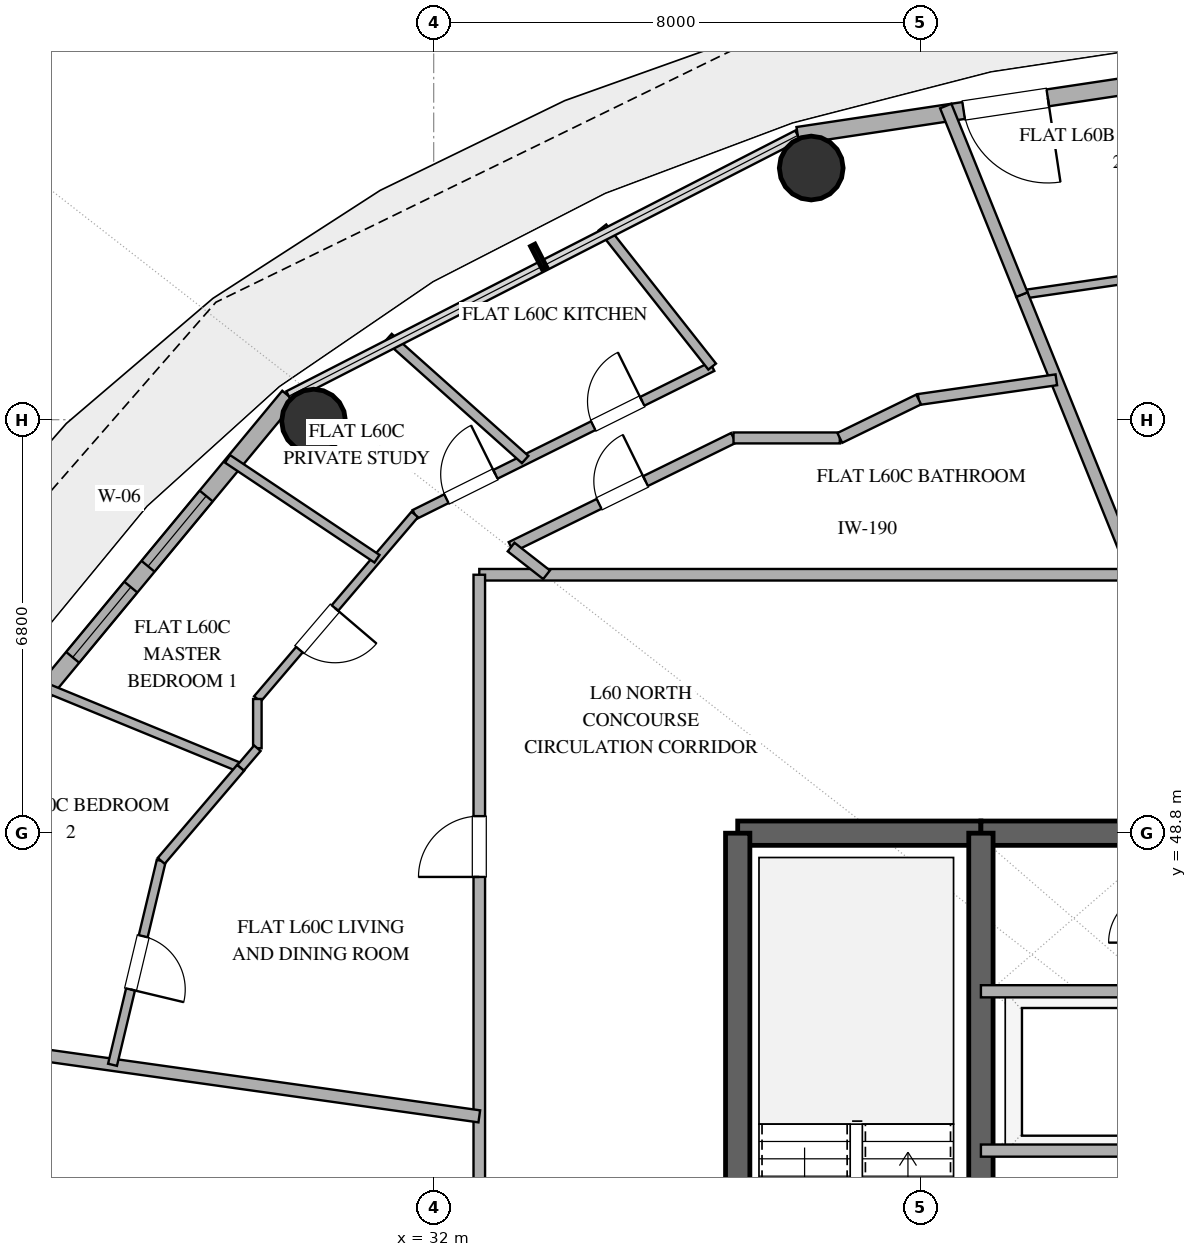
"""IFC4 building model, lengths in metres.
Left out: names, types, materials, properties, quantities, classifications, styles, units other than length and angle.
Written with IfcOpenShell. Run it as: python <this file> out.ifc"""

import sys

from ifc_helpers import new_model, si_unit, direction, frame, frame_2d, origin, origin_2d, place, context, subcontext, project, spatial, rectangle, hollow_circle, extrude, element, fill, save


model = new_model("IFC4")
c1 = context("Model", 3, precision=1e-05, world=origin(), true_north=direction((0.0, 1.0)))
c2 = subcontext(c1, "Body", "Model", "MODEL_VIEW")
j1 = project(units=[si_unit("LENGTHUNIT", "METRE"), si_unit("PLANEANGLEUNIT", "RADIAN")], contexts=[c1])
p1 = place(None, origin())
s1 = spatial("IfcSite", under=j1, at=p1, CompositionType="ELEMENT")
p2 = place(p1, origin())
s2 = spatial("IfcBuilding", under=s1, at=p2, CompositionType="ELEMENT")
p3 = place(p2, frame((0.0, 0.0, 235.2)))
s3 = spatial("IfcBuildingStorey", under=s2, at=p3, CompositionType="ELEMENT", Elevation=235.2)
p4 = place(p3, frame((37.0, 48.8, 0.0), z_axis=(0.0, 0.0, 1.0), x_axis=(1.0, 0.0, 0.0)))
e1 = element("IfcWall", 1, at=p4, inside=s3, PredefinedType="SHEAR", context=c2, shape_type="SweptSolid", body=[
    extrude(rectangle(XDim=4.0, YDim=0.4, at=frame_2d((2.0, 0.0))), origin(), (0.0, 0.0, 1.0), 3.36),
])
p5 = place(p3, frame((41.0, 48.8, 0.0), z_axis=(0.0, 0.0, 1.0), x_axis=(1.0, 0.0, 0.0)))
e2 = element("IfcWall", 2, at=p5, inside=s3, PredefinedType="SHEAR", context=c2, shape_type="SweptSolid", body=[
    extrude(rectangle(XDim=14.0, YDim=0.4, at=frame_2d((7.0, 0.0))), origin(), (0.0, 0.0, 1.0), 3.36),
])
p6 = place(p5, frame((6.1, 0.0, 0.0)))
e3 = element("IfcOpeningElement", 3, at=p6, cuts=e2, PredefinedType="OPENING", context=c2, shape_type="SweptSolid", body=[
    extrude(rectangle(XDim=1.8, YDim=2.25, at=frame_2d((0.9, 1.125))), frame((0.0, 0.21, 0.0), z_axis=(0.0, -1.0, 0.0), x_axis=(1.0, 0.0, 0.0)), (0.0, 0.0, 1.0), 0.42),
])
p7 = place(p3, frame((37.0, 35.2, 0.0), z_axis=(0.0, 0.0, 1.0), x_axis=(0.0, 1.0, 0.0)))
e4 = element("IfcWall", 4, at=p7, inside=s3, PredefinedType="SHEAR", context=c2, shape_type="SweptSolid", body=[
    extrude(rectangle(XDim=13.6, YDim=0.4, at=frame_2d((6.8, 0.0))), origin(), (0.0, 0.0, 1.0), 3.36),
])
p8 = place(p3, frame((41.0, 35.2, 0.0), z_axis=(0.0, 0.0, 1.0), x_axis=(0.0, 1.0, 0.0)))
e5 = element("IfcWall", 5, at=p8, inside=s3, PredefinedType="SHEAR", context=c2, shape_type="SweptSolid", body=[
    extrude(rectangle(XDim=13.6, YDim=0.4, at=frame_2d((6.8, 0.0))), origin(), (0.0, 0.0, 1.0), 3.36),
])
p9 = place(p8, frame((1.15, 0.0, 0.0)))
e6 = element("IfcOpeningElement", 6, at=p9, cuts=e5, PredefinedType="OPENING", context=c2, shape_type="SweptSolid", body=[
    extrude(rectangle(XDim=1.1, YDim=2.2, at=frame_2d((0.55, 1.1))), frame((0.0, 0.21, 0.0), z_axis=(0.0, -1.0, 0.0), x_axis=(1.0, 0.0, 0.0)), (0.0, 0.0, 1.0), 0.42),
])
for number, where, z_axis, x_axis in (
    (7, (38.209, 59.739, 0.0), (0.0, 0.0, 1.0), (1.0, 0.0, 0.0)),
    (8, (30.025, 55.576, 0.0), (0.0, 0.0, 1.0), (1.0, 0.0, 0.0)),
):
    element("IfcColumn", number, at=place(p3, frame(where, z_axis=z_axis, x_axis=x_axis)), inside=s3, PredefinedType="COLUMN", context=c2, shape_type="SweptSolid", body=[
        extrude(hollow_circle(Radius=0.525, WallThickness=0.028, at=origin_2d()), origin(), (0.0, 0.0, 1.0), 3.36),
    ])
p10 = place(p3, frame((48.0, 61.78, 0.0), z_axis=(0.0, 0.0, 1.0), x_axis=(-0.988882522213, -0.148698881169, 0.0)))
e9 = element("IfcWall", 9, at=p10, inside=s3, PredefinedType="SOLIDWALL", context=c2, shape_type="SweptSolid", body=[
    extrude(rectangle(XDim=10.125, YDim=0.28, at=frame_2d((5.062, 0.0))), origin(), (0.0, 0.0, 1.0), 3.36),
])
p11 = place(p10, frame((5.967, 0.0, 0.0)))
e10 = element("IfcOpeningElement", 10, at=p11, cuts=e9, PredefinedType="OPENING", context=c2, shape_type="SweptSolid", body=[
    extrude(rectangle(XDim=1.4, YDim=2.2, at=frame_2d((0.7, 1.1))), frame((0.0, 0.15, 0.0), z_axis=(0.0, -1.0, 0.0), x_axis=(1.0, 0.0, 0.0)), (0.0, 0.0, 1.0), 0.3),
])
p12 = place(p10, frame((0.866, 0.0, 0.85)))
e11 = element("IfcOpeningElement", 11, at=p12, cuts=e9, PredefinedType="OPENING", context=c2, shape_type="SweptSolid", body=[
    extrude(rectangle(XDim=1.0, YDim=1.8, at=frame_2d((0.5, 0.9))), frame((0.0, 0.15, 0.0), z_axis=(0.0, -1.0, 0.0), x_axis=(1.0, 0.0, 0.0)), (0.0, 0.0, 1.0), 0.3),
])
p13 = place(p3, frame((29.617, 55.987, 0.0), z_axis=(0.0, 0.0, 1.0), x_axis=(-0.63761509934, -0.770355103243, 0.0)))
e12 = element("IfcWall", 12, at=p13, inside=s3, PredefinedType="SOLIDWALL", context=c2, shape_type="SweptSolid", body=[
    extrude(rectangle(XDim=8.33, YDim=0.28, at=frame_2d((4.165, 0.0))), origin(), (0.0, 0.0, 1.0), 3.36),
])
p14 = place(p13, frame((2.131, 0.0, 0.85)))
e13 = element("IfcOpeningElement", 13, at=p14, cuts=e12, PredefinedType="OPENING", context=c2, shape_type="SweptSolid", body=[
    extrude(rectangle(XDim=1.5, YDim=2.0, at=frame_2d((0.75, 1.0))), frame((0.0, 0.15, 0.0), z_axis=(0.0, -1.0, 0.0), x_axis=(1.0, 0.0, 0.0)), (0.0, 0.0, 1.0), 0.3),
])
p15 = place(p13, frame((4.075, 0.0, 0.85)))
e14 = element("IfcOpeningElement", 14, at=p15, cuts=e12, PredefinedType="OPENING", context=c2, shape_type="SweptSolid", body=[
    extrude(rectangle(XDim=1.5, YDim=2.0, at=frame_2d((0.75, 1.0))), frame((0.0, 0.15, 0.0), z_axis=(0.0, -1.0, 0.0), x_axis=(1.0, 0.0, 0.0)), (0.0, 0.0, 1.0), 0.3),
])
p16 = place(p13, frame((6.536, 0.0, 0.85)))
e15 = element("IfcOpeningElement", 15, at=p16, cuts=e12, PredefinedType="OPENING", context=c2, shape_type="SweptSolid", body=[
    extrude(rectangle(XDim=0.85, YDim=1.8, at=frame_2d((0.425, 0.9))), frame((0.0, 0.15, 0.0), z_axis=(0.0, -1.0, 0.0), x_axis=(1.0, 0.0, 0.0)), (0.0, 0.0, 1.0), 0.3),
])
for number, where, z_axis, x_axis in (
    (16, (41.0, 46.2, 0.0), (0.0, 0.0, 1.0), (1.0, 0.0, 0.0)),
    (17, (41.0, 43.58, 0.0), (0.0, 0.0, 1.0), (1.0, 0.0, 0.0)),
):
    element("IfcWall", number, at=place(p3, frame(where, z_axis=z_axis, x_axis=x_axis)), inside=s3, PredefinedType="SOLIDWALL", context=c2, shape_type="SweptSolid", body=[
        extrude(rectangle(XDim=2.95, YDim=0.2, at=frame_2d((1.475, 0.0))), origin(), (0.0, 0.0, 1.0), 2.72),
    ])
p17 = place(p3, frame((23.868, 45.392, 0.0), z_axis=(0.0, 0.0, 1.0), x_axis=(0.281018983641, -0.959702209455, 0.0)))
e18 = element("IfcWall", 18, at=p17, inside=s3, PredefinedType="PLUMBINGWALL", context=c2, shape_type="SweptSolid", body=[
    extrude(rectangle(XDim=10.036, YDim=0.16, at=frame_2d((5.018, 0.0))), origin(), (0.0, 0.0, 1.0), 2.72),
])
p18 = place(p17, frame((4.568, 0.0, 0.0)))
e19 = element("IfcOpeningElement", 19, at=p18, cuts=e18, PredefinedType="OPENING", context=c2, shape_type="SweptSolid", body=[
    extrude(rectangle(XDim=0.9, YDim=2.1, at=frame_2d((0.45, 1.05))), frame((0.0, 0.09, 0.0), z_axis=(0.0, -1.0, 0.0), x_axis=(1.0, 0.0, 0.0)), (0.0, 0.0, 1.0), 0.18),
])
p19 = place(p3, frame((32.75, 53.05, 0.0), z_axis=(0.0, 0.0, 1.0), x_axis=(1.0, 0.0, 0.0)))
e20 = element("IfcWall", 20, at=p19, inside=s3, PredefinedType="PARTITIONING", context=c2, shape_type="SweptSolid", body=[
    extrude(rectangle(XDim=12.766, YDim=0.19, at=frame_2d((6.383, 0.0))), origin(), (0.0, 0.0, 1.0), 2.72),
])
p20 = place(p3, frame((32.75, 42.243, 0.0), z_axis=(0.0, 0.0, 1.0), x_axis=(0.0, 1.0, 0.0)))
e21 = element("IfcWall", 21, at=p20, inside=s3, PredefinedType="PARTITIONING", context=c2, shape_type="SweptSolid", body=[
    extrude(rectangle(XDim=10.807, YDim=0.19, at=frame_2d((5.404, 0.0))), origin(), (0.0, 0.0, 1.0), 2.72),
])
p21 = place(p20, frame((5.837, 0.0, 0.0)))
e22 = element("IfcOpeningElement", 22, at=p21, cuts=e21, PredefinedType="OPENING", context=c2, shape_type="SweptSolid", body=[
    extrude(rectangle(XDim=1.0, YDim=2.2, at=frame_2d((0.5, 1.1))), frame((0.0, 0.105, 0.0), z_axis=(0.0, -1.0, 0.0), x_axis=(1.0, 0.0, 0.0)), (0.0, 0.0, 1.0), 0.21),
])
p22 = place(p3, frame((23.237, 45.48, 0.0), z_axis=(0.0, 0.0, 1.0), x_axis=(0.990269661234, -0.139161769316, 0.0)))
e23 = element("IfcWall", 23, at=p22, inside=s3, PredefinedType="PARTITIONING", context=c2, shape_type="SweptSolid", body=[
    extrude(rectangle(XDim=9.607, YDim=0.2, at=frame_2d((4.803, 0.0))), origin(), (0.0, 0.0, 1.0), 2.72),
])
p23 = place(p3, frame((41.674, 57.657, 0.0), z_axis=(0.0, 0.0, 1.0), x_axis=(0.989537524877, 0.144275732054, 0.0)))
e24 = element("IfcWall", 24, at=p23, inside=s3, PredefinedType="PARTITIONING", context=c2, shape_type="SweptSolid", body=[
    extrude(rectangle(XDim=6.393, YDim=0.14, at=frame_2d((3.197, 0.0))), origin(), (0.0, 0.0, 1.0), 2.72),
])
p24 = place(p23, frame((1.609, 0.0, 0.0)))
e25 = element("IfcOpeningElement", 25, at=p24, cuts=e24, PredefinedType="OPENING", context=c2, shape_type="SweptSolid", body=[
    extrude(rectangle(XDim=0.9, YDim=2.1, at=frame_2d((0.45, 1.05))), frame((0.0, 0.08, 0.0), z_axis=(0.0, -1.0, 0.0), x_axis=(1.0, 0.0, 0.0)), (0.0, 0.0, 1.0), 0.16),
])
p25 = place(p23, frame((4.789, 0.0, 0.0)))
e26 = element("IfcOpeningElement", 26, at=p25, cuts=e24, PredefinedType="OPENING", context=c2, shape_type="SweptSolid", body=[
    extrude(rectangle(XDim=0.9, YDim=2.1, at=frame_2d((0.45, 1.05))), frame((0.0, 0.08, 0.0), z_axis=(0.0, -1.0, 0.0), x_axis=(1.0, 0.0, 0.0)), (0.0, 0.0, 1.0), 0.16),
])
p26 = place(p3, frame((33.273, 53.506, 0.0), z_axis=(0.0, 0.0, 1.0), x_axis=(0.89778136281, 0.440441397454, 0.0)))
e27 = element("IfcWall", 27, at=p26, inside=s3, PredefinedType="PLUMBINGWALL", context=c2, shape_type="SweptSolid", body=[
    extrude(rectangle(XDim=4.074, YDim=0.18, at=frame_2d((2.037, 0.0))), origin(), (0.0, 0.0, 1.0), 2.72),
])
p27 = place(p26, frame((1.612, 0.0, 0.0)))
e28 = element("IfcOpeningElement", 28, at=p27, cuts=e27, PredefinedType="OPENING", context=c2, shape_type="SweptSolid", body=[
    extrude(rectangle(XDim=0.85, YDim=2.1, at=frame_2d((0.425, 1.05))), frame((0.0, 0.1, 0.0), z_axis=(0.0, -1.0, 0.0), x_axis=(1.0, 0.0, 0.0)), (0.0, 0.0, 1.0), 0.2),
])
p28 = place(p3, frame((25.531, 51.229, 0.0), z_axis=(0.0, 0.0, 1.0), x_axis=(0.925009924445, -0.37994294266, 0.0)))
e29 = element("IfcWall", 29, at=p28, inside=s3, PredefinedType="PARTITIONING", context=c2, shape_type="SweptSolid", body=[
    extrude(rectangle(XDim=3.562, YDim=0.15, at=frame_2d((1.781, 0.0))), origin(), (0.0, 0.0, 1.0), 2.72),
])
p29 = place(p3, frame((31.689, 54.042, 0.0), z_axis=(0.0, 0.0, 1.0), x_axis=(0.895479575413, 0.445102606168, 0.0)))
e30 = element("IfcWall", 30, at=p29, inside=s3, PredefinedType="PLUMBINGWALL", context=c2, shape_type="SweptSolid", body=[
    extrude(rectangle(XDim=5.462, YDim=0.16, at=frame_2d((2.731, 0.0))), origin(), (0.0, 0.0, 1.0), 2.72),
])
p30 = place(p29, frame((3.278, 0.0, 0.0)))
e31 = element("IfcOpeningElement", 31, at=p30, cuts=e30, PredefinedType="OPENING", context=c2, shape_type="SweptSolid", body=[
    extrude(rectangle(XDim=0.9, YDim=2.1, at=frame_2d((0.45, 1.05))), frame((0.0, 0.09, 0.0), z_axis=(0.0, -1.0, 0.0), x_axis=(1.0, 0.0, 0.0)), (0.0, 0.0, 1.0), 0.18),
])
p31 = place(p29, frame((0.581, 0.0, 0.0)))
e32 = element("IfcOpeningElement", 32, at=p31, cuts=e30, PredefinedType="OPENING", context=c2, shape_type="SweptSolid", body=[
    extrude(rectangle(XDim=0.9, YDim=2.1, at=frame_2d((0.45, 1.05))), frame((0.0, 0.09, 0.0), z_axis=(0.0, -1.0, 0.0), x_axis=(1.0, 0.0, 0.0)), (0.0, 0.0, 1.0), 0.18),
])
p32 = place(p3, frame((41.674, 57.657, 0.0), z_axis=(0.0, 0.0, 1.0), x_axis=(0.374573524941, -0.927197214412, 0.0)))
e33 = element("IfcWall", 33, at=p32, inside=s3, PredefinedType="PARTITIONING", context=c2, shape_type="SweptSolid", body=[
    extrude(rectangle(XDim=4.969, YDim=0.2, at=frame_2d((2.485, 0.0))), origin(), (0.0, 0.0, 1.0), 2.72),
])
p33 = place(p3, frame((27.519, 48.345, 0.0), z_axis=(0.0, 0.0, 1.0), x_axis=(-0.232293676314, -0.97264569497, 0.0)))
e34 = element("IfcWall", 34, at=p33, inside=s3, PredefinedType="PARTITIONING", context=c2, shape_type="SweptSolid", body=[
    extrude(rectangle(XDim=3.448, YDim=0.15, at=frame_2d((1.724, 0.0))), origin(), (0.0, 0.0, 1.0), 2.72),
])
p34 = place(p33, frame((1.274, 0.0, 0.0)))
e35 = element("IfcOpeningElement", 35, at=p34, cuts=e34, PredefinedType="OPENING", context=c2, shape_type="SweptSolid", body=[
    extrude(rectangle(XDim=0.9, YDim=2.1, at=frame_2d((0.45, 1.05))), frame((0.0, 0.085, 0.0), z_axis=(0.0, -1.0, 0.0), x_axis=(1.0, 0.0, 0.0)), (0.0, 0.0, 1.0), 0.17),
])
p35 = place(p3, frame((41.674, 57.657, 0.0), z_axis=(0.0, 0.0, 1.0), x_axis=(-0.374572886439, 0.927197472357, 0.0)))
e36 = element("IfcWall", 36, at=p35, inside=s3, PredefinedType="PARTITIONING", context=c2, shape_type="SweptSolid", body=[
    extrude(rectangle(XDim=3.344, YDim=0.2, at=frame_2d((1.672, 0.0))), origin(), (0.0, 0.0, 1.0), 2.72),
])
p36 = place(p3, frame((31.689, 54.042, 0.0), z_axis=(0.0, 0.0, 1.0), x_axis=(-0.648985159088, -0.760801066826, 0.0)))
e37 = element("IfcWall", 37, at=p36, inside=s3, PredefinedType="PARTITIONING", context=c2, shape_type="SweptSolid", body=[
    extrude(rectangle(XDim=3.989, YDim=0.14, at=frame_2d((1.995, 0.0))), origin(), (0.0, 0.0, 1.0), 2.72),
])
p37 = place(p36, frame((2.023, 0.0, 0.0)))
e38 = element("IfcOpeningElement", 38, at=p37, cuts=e37, PredefinedType="OPENING", context=c2, shape_type="SweptSolid", body=[
    extrude(rectangle(XDim=0.9, YDim=2.1, at=frame_2d((0.45, 1.05))), frame((0.0, 0.08, 0.0), z_axis=(0.0, -1.0, 0.0), x_axis=(1.0, 0.0, 0.0)), (0.0, 0.0, 1.0), 0.16),
])
p38 = place(p3, frame((33.505, 54.945, 0.0), z_axis=(0.0, 0.0, 1.0), x_axis=(-0.745914664094, 0.66604152565, 0.0)))
e39 = element("IfcWall", 39, at=p38, inside=s3, PredefinedType="PLUMBINGWALL", context=c2, shape_type="SweptSolid", body=[
    extrude(rectangle(XDim=3.014, YDim=0.16, at=frame_2d((1.507, 0.0))), origin(), (0.0, 0.0, 1.0), 2.72),
])
p39 = place(p3, frame((28.609, 54.956, 0.0), z_axis=(0.0, 0.0, 1.0), x_axis=(0.831478101563, -0.555557527733, 0.0)))
e40 = element("IfcWall", 40, at=p39, inside=s3, PredefinedType="PARTITIONING", context=c2, shape_type="SweptSolid", body=[
    extrude(rectangle(XDim=2.956, YDim=0.15, at=frame_2d((1.478, 0.0))), origin(), (0.0, 0.0, 1.0), 2.72),
])
p40 = place(p3, frame((36.58, 56.473, 0.0), z_axis=(0.0, 0.0, 1.0), x_axis=(-0.619378047354, 0.785092882694, 0.0)))
e41 = element("IfcWall", 41, at=p40, inside=s3, PredefinedType="PLUMBINGWALL", context=c2, shape_type="SweptSolid", body=[
    extrude(rectangle(XDim=2.914, YDim=0.16, at=frame_2d((1.457, 0.0))), origin(), (0.0, 0.0, 1.0), 2.72),
])
p41 = place(p3, frame((39.976, 55.932, 0.0), z_axis=(0.0, 0.0, 1.0), x_axis=(0.989917445937, 0.141645509032, 0.0)))
e42 = element("IfcWall", 42, at=p41, inside=s3, PredefinedType="PLUMBINGWALL", context=c2, shape_type="SweptSolid", body=[
    extrude(rectangle(XDim=2.287, YDim=0.18, at=frame_2d((1.144, 0.0))), origin(), (0.0, 0.0, 1.0), 2.72),
])
p42 = place(p3, frame((28.826, 49.876, 0.0), z_axis=(0.0, 0.0, 1.0), x_axis=(-0.649252114502, -0.760573265251, 0.0)))
e43 = element("IfcWall", 43, at=p42, inside=s3, PredefinedType="PARTITIONING", context=c2, shape_type="SweptSolid", body=[
    extrude(rectangle(XDim=2.013, YDim=0.15, at=frame_2d((1.007, 0.0))), origin(), (0.0, 0.0, 1.0), 2.72),
])
p43 = place(p3, frame((36.931, 55.3, 0.0), z_axis=(0.0, 0.0, 1.0), x_axis=(1.0, 0.0, 0.0)))
e44 = element("IfcWall", 44, at=p43, inside=s3, PredefinedType="PLUMBINGWALL", context=c2, shape_type="SweptSolid", body=[
    extrude(rectangle(XDim=1.748, YDim=0.18, at=frame_2d((0.874, 0.0))), origin(), (0.0, 0.0, 1.0), 2.72),
])
p44 = place(p3, frame((38.679, 55.3, 0.0), z_axis=(0.0, 0.0, 1.0), x_axis=(0.898916394035, 0.438120207861, 0.0)))
e45 = element("IfcWall", 45, at=p44, inside=s3, PredefinedType="PLUMBINGWALL", context=c2, shape_type="SweptSolid", body=[
    extrude(rectangle(XDim=1.443, YDim=0.18, at=frame_2d((0.721, 0.0))), origin(), (0.0, 0.0, 1.0), 2.72),
])
p45 = place(p3, frame((29.1, 51.007, 0.0), z_axis=(0.0, 0.0, 1.0), x_axis=(0.0, -1.0, 0.0)))
e46 = element("IfcWall", 46, at=p45, inside=s3, PredefinedType="PARTITIONING", context=c2, shape_type="SweptSolid", body=[
    extrude(rectangle(XDim=0.81, YDim=0.14, at=frame_2d((0.405, 0.0))), origin(), (0.0, 0.0, 1.0), 2.72),
])
p46 = place(p3, frame((33.857, 53.05, 0.0), z_axis=(0.0, 0.0, 1.0), x_axis=(-0.788214334349, 0.615400815019, 0.0)))
e47 = element("IfcWall", 47, at=p46, inside=s3, PredefinedType="PLUMBINGWALL", context=c2, shape_type="SweptSolid", body=[
    extrude(rectangle(XDim=0.74, YDim=0.18, at=frame_2d((0.37, 0.0))), origin(), (0.0, 0.0, 1.0), 2.72),
])
p47 = place(p3, frame((29.1, 50.197, 0.0), z_axis=(0.0, 0.0, 1.0), x_axis=(-0.649360360175, -0.760480849617, 0.0)))
e48 = element("IfcWall", 48, at=p47, inside=s3, PredefinedType="PARTITIONING", context=c2, shape_type="SweptSolid", body=[
    extrude(rectangle(XDim=0.422, YDim=0.14, at=frame_2d((0.211, 0.0))), origin(), (0.0, 0.0, 1.0), 2.72),
])
p48 = place(p11, origin())
e49 = element("IfcDoor", 49, at=p48, inside=s3, OperationType="SINGLE_SWING_LEFT", PredefinedType="DOOR", context=c2, shape_type="SweptSolid", body=[
    extrude(rectangle(XDim=1.4, YDim=2.2, at=frame_2d((0.7, 1.1))), frame((0.0, 0.025, 0.0), z_axis=(0.0, -1.0, 0.0), x_axis=(1.0, 0.0, 0.0)), (0.0, 0.0, 1.0), 0.05),
])
fill(e10, e49)
p49 = place(p14, origin())
e50 = element("IfcWindow", 50, at=p49, inside=s3, PartitioningType="SINGLE_PANEL", PredefinedType="WINDOW", context=c2, shape_type="SweptSolid", body=[
    extrude(rectangle(XDim=1.5, YDim=2.0, at=frame_2d((0.75, 1.0))), frame((0.0, 0.03, 0.0), z_axis=(0.0, -1.0, 0.0), x_axis=(1.0, 0.0, 0.0)), (0.0, 0.0, 1.0), 0.06),
])
fill(e13, e50)
p50 = place(p15, origin())
e51 = element("IfcWindow", 51, at=p50, inside=s3, PartitioningType="SINGLE_PANEL", PredefinedType="WINDOW", context=c2, shape_type="SweptSolid", body=[
    extrude(rectangle(XDim=1.5, YDim=2.0, at=frame_2d((0.75, 1.0))), frame((0.0, 0.03, 0.0), z_axis=(0.0, -1.0, 0.0), x_axis=(1.0, 0.0, 0.0)), (0.0, 0.0, 1.0), 0.06),
])
fill(e14, e51)
p51 = place(p21, origin())
e52 = element("IfcDoor", 52, at=p51, inside=s3, OperationType="SINGLE_SWING_LEFT", PredefinedType="DOOR", context=c2, shape_type="SweptSolid", body=[
    extrude(rectangle(XDim=1.0, YDim=2.2, at=frame_2d((0.5, 1.1))), frame((0.0, 0.025, 0.0), z_axis=(0.0, -1.0, 0.0), x_axis=(1.0, 0.0, 0.0)), (0.0, 0.0, 1.0), 0.05),
])
fill(e22, e52)
p52 = place(p27, origin())
e53 = element("IfcDoor", 53, at=p52, inside=s3, OperationType="SINGLE_SWING_RIGHT", PredefinedType="DOOR", context=c2, shape_type="SweptSolid", body=[
    extrude(rectangle(XDim=0.85, YDim=2.1, at=frame_2d((0.425, 1.05))), frame((0.0, 0.025, 0.0), z_axis=(0.0, -1.0, 0.0), x_axis=(1.0, 0.0, 0.0)), (0.0, 0.0, 1.0), 0.05),
])
fill(e28, e53)
p53 = place(p30, origin())
e54 = element("IfcDoor", 54, at=p53, inside=s3, OperationType="SINGLE_SWING_RIGHT", PredefinedType="DOOR", context=c2, shape_type="SweptSolid", body=[
    extrude(rectangle(XDim=0.9, YDim=2.1, at=frame_2d((0.45, 1.05))), frame((0.0, 0.025, 0.0), z_axis=(0.0, -1.0, 0.0), x_axis=(1.0, 0.0, 0.0)), (0.0, 0.0, 1.0), 0.05),
])
fill(e31, e54)
p54 = place(p31, origin())
e55 = element("IfcDoor", 55, at=p54, inside=s3, OperationType="SINGLE_SWING_RIGHT", PredefinedType="DOOR", context=c2, shape_type="SweptSolid", body=[
    extrude(rectangle(XDim=0.9, YDim=2.1, at=frame_2d((0.45, 1.05))), frame((0.0, 0.025, 0.0), z_axis=(0.0, -1.0, 0.0), x_axis=(1.0, 0.0, 0.0)), (0.0, 0.0, 1.0), 0.05),
])
fill(e32, e55)
p55 = place(p34, origin())
e56 = element("IfcDoor", 56, at=p55, inside=s3, OperationType="SINGLE_SWING_RIGHT", PredefinedType="DOOR", context=c2, shape_type="SweptSolid", body=[
    extrude(rectangle(XDim=0.9, YDim=2.1, at=frame_2d((0.45, 1.05))), frame((0.0, 0.025, 0.0), z_axis=(0.0, -1.0, 0.0), x_axis=(1.0, 0.0, 0.0)), (0.0, 0.0, 1.0), 0.05),
])
fill(e35, e56)
p56 = place(p37, origin())
e57 = element("IfcDoor", 57, at=p56, inside=s3, OperationType="SINGLE_SWING_LEFT", PredefinedType="DOOR", context=c2, shape_type="SweptSolid", body=[
    extrude(rectangle(XDim=0.9, YDim=2.1, at=frame_2d((0.45, 1.05))), frame((0.0, 0.025, 0.0), z_axis=(0.0, -1.0, 0.0), x_axis=(1.0, 0.0, 0.0)), (0.0, 0.0, 1.0), 0.05),
])
fill(e38, e57)
save(model, sys.argv[1])
